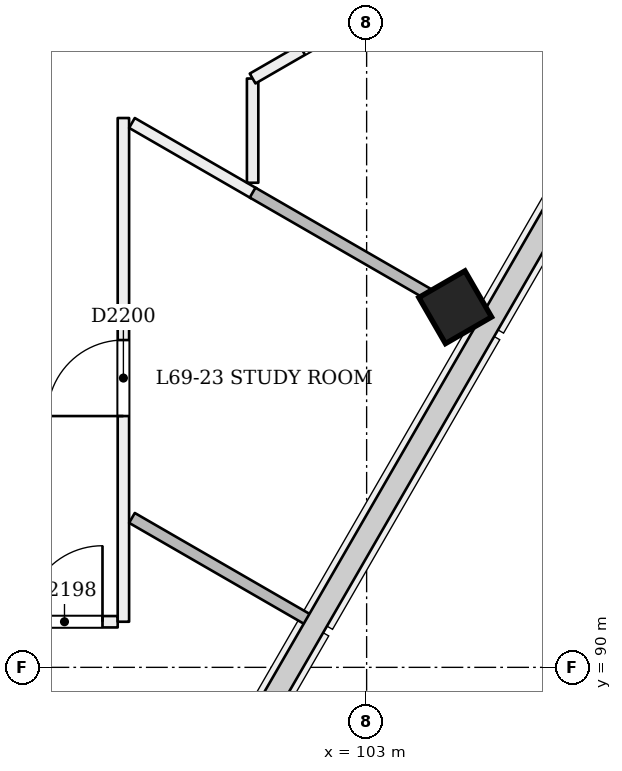
"""IFC4 building model, lengths in metres.
Left out: names, types, materials, properties, quantities, classifications, styles, units other than length and angle.
Written with IfcOpenShell. Run it as: python <this file> out.ifc"""

import sys

from ifc_helpers import new_model, si_unit, direction, frame, frame_2d, origin, origin_2d, place, context, subcontext, project, spatial, rectangle, extrude, element, fill, save


model = new_model("IFC4")
c1 = context("Model", 3, precision=1e-05, world=origin(), true_north=direction((0.0, 1.0)))
c2 = subcontext(c1, "Body", "Model", "MODEL_VIEW")
j1 = project(units=[si_unit("LENGTHUNIT", "METRE"), si_unit("PLANEANGLEUNIT", "RADIAN")], contexts=[c1])
p1 = place(None, origin())
s1 = spatial("IfcSite", under=j1, at=p1, CompositionType="ELEMENT")
p2 = place(p1, origin())
s2 = spatial("IfcBuilding", under=s1, at=p2, CompositionType="ELEMENT")
p3 = place(p2, frame((0.0, 0.0, 268.0)))
s3 = spatial("IfcBuildingStorey", under=s2, at=p3, CompositionType="ELEMENT", Elevation=268.0)
p4 = place(p3, frame((104.192, 94.69, -0.021), z_axis=(-0.02215369191, 0.038413282303, 0.999016333038), x_axis=(-0.500652759639, -0.865364210869, 0.022171982582)))
e1 = element("IfcColumn", 1, at=p4, inside=s3, PredefinedType="COLUMN", context=c2, shape_type="SweptSolid", body=[
    extrude(rectangle(XDim=0.7, YDim=0.7, at=origin_2d()), origin(), (0.0, 0.0, 1.0), 3.604),
])
p5 = place(p3, frame((94.844, 90.6, 0.0), z_axis=(0.0, 0.0, 1.0), x_axis=(1.0, 0.0, 0.0)))
e2 = element("IfcWall", 2, at=p5, inside=s3, PredefinedType="PARTITIONING", context=c2, shape_type="SweptSolid", body=[
    extrude(rectangle(XDim=4.881, YDim=0.15, at=frame_2d((2.44, 0.0))), origin(), (0.0, 0.0, 1.0), 3.2),
])
p6 = place(p5, frame((3.681, 0.0, 0.0)))
e3 = element("IfcOpeningElement", 3, at=p6, cuts=e2, PredefinedType="OPENING", context=c2, shape_type="SweptSolid", body=[
    extrude(rectangle(XDim=1.0, YDim=2.1, at=frame_2d((0.5, 1.05))), frame((0.0, 0.085, 0.0), z_axis=(0.0, -1.0, 0.0), x_axis=(1.0, 0.0, 0.0)), (0.0, 0.0, 1.0), 0.171),
])
p7 = place(p3, frame((99.8, 90.6, 0.0), z_axis=(0.0, 0.0, 1.0), x_axis=(0.0, 1.0, 0.0)))
e4 = element("IfcWall", 4, at=p7, inside=s3, PredefinedType="PARTITIONING", context=c2, shape_type="SweptSolid", body=[
    extrude(rectangle(XDim=6.627, YDim=0.15, at=frame_2d((3.313, 0.0))), origin(), (0.0, 0.0, 1.0), 3.2),
])
p8 = place(p7, frame((2.706, 0.0, 0.0)))
e5 = element("IfcOpeningElement", 5, at=p8, cuts=e4, PredefinedType="OPENING", context=c2, shape_type="SweptSolid", body=[
    extrude(rectangle(XDim=1.0, YDim=2.1, at=frame_2d((0.5, 1.05))), frame((0.0, 0.085, 0.0), z_axis=(0.0, -1.0, 0.0), x_axis=(1.0, 0.0, 0.0)), (0.0, 0.0, 1.0), 0.171),
])
p9 = place(p3, frame((99.913, 97.162, 0.0), z_axis=(0.0, 0.0, 1.0), x_axis=(0.866021029023, -0.500007577232, 0.0)))
e6 = element("IfcWall", 6, at=p9, inside=s3, PredefinedType="PARTITIONING", context=c2, shape_type="SweptSolid", body=[
    extrude(rectangle(XDim=1.853, YDim=0.15, at=frame_2d((0.927, 0.0))), origin(), (0.0, 0.0, 1.0), 3.2),
])
p10 = place(p3, frame((101.5, 96.375, 0.0), z_axis=(0.0, 0.0, 1.0), x_axis=(0.0, 1.0, 0.0)))
e7 = element("IfcWall", 7, at=p10, inside=s3, PredefinedType="PARTITIONING", context=c2, shape_type="SweptSolid", body=[
    extrude(rectangle(XDim=1.371, YDim=0.15, at=frame_2d((0.686, 0.0))), origin(), (0.0, 0.0, 1.0), 3.2),
])
p11 = place(p3, frame((101.5, 97.747, 0.0), z_axis=(0.0, 0.0, 1.0), x_axis=(0.866036427558, 0.499980905779, 0.0)))
e8 = element("IfcWall", 8, at=p11, inside=s3, PredefinedType="PARTITIONING", context=c2, shape_type="SweptSolid", body=[
    extrude(rectangle(XDim=2.262, YDim=0.15, at=frame_2d((1.131, 0.0))), origin(), (0.0, 0.0, 1.0), 3.2),
])
p12 = place(p11, frame((0.753, 0.0, 0.0)))
e9 = element("IfcOpeningElement", 9, at=p12, cuts=e8, PredefinedType="OPENING", context=c2, shape_type="SweptSolid", body=[
    extrude(rectangle(XDim=1.2, YDim=2.1, at=frame_2d((0.6, 1.05))), frame((0.0, 0.085, 0.0), z_axis=(0.0, -1.0, 0.0), x_axis=(1.0, 0.0, 0.0)), (0.0, 0.0, 1.0), 0.171),
])
p13 = place(p3, frame((102.262, 90.609, 0.0), z_axis=(0.0, 0.0, 1.0), x_axis=(-0.866025261224, 0.500000246922, 0.0)))
e10 = element("IfcWall", 10, at=p13, inside=s3, PredefinedType="PARTITIONING", context=c2, shape_type="SweptSolid", body=[
    extrude(rectangle(XDim=2.713, YDim=0.15, at=frame_2d((1.357, 0.0))), origin(), (0.0, 0.0, 1.0), 2.7),
])
p14 = place(p3, frame((104.495, 94.516, 0.0), z_axis=(0.0, 0.0, 1.0), x_axis=(-0.866053925764, 0.499950595228, 0.0)))
e11 = element("IfcWall", 11, at=p14, inside=s3, PredefinedType="PARTITIONING", context=c2, shape_type="SweptSolid", body=[
    extrude(rectangle(XDim=3.458, YDim=0.15, at=frame_2d((1.729, 0.0))), origin(), (0.0, 0.0, 1.0), 2.7),
])
p15 = place(p6, origin())
e12 = element("IfcDoor", 12, at=p15, inside=s3, OperationType="SINGLE_SWING_RIGHT", PredefinedType="NOTDEFINED", context=c2, shape_type="SweptSolid", body=[
    extrude(rectangle(XDim=1.0, YDim=2.1, at=frame_2d((0.5, 1.05))), frame((0.0, 0.025, 0.0), z_axis=(0.0, -1.0, 0.0), x_axis=(1.0, 0.0, 0.0)), (0.0, 0.0, 1.0), 0.05),
])
fill(e3, e12)
p16 = place(p8, origin())
e13 = element("IfcDoor", 13, at=p16, inside=s3, OperationType="SINGLE_SWING_LEFT", PredefinedType="NOTDEFINED", context=c2, shape_type="SweptSolid", body=[
    extrude(rectangle(XDim=1.0, YDim=2.1, at=frame_2d((0.5, 1.05))), frame((0.0, 0.025, 0.0), z_axis=(0.0, -1.0, 0.0), x_axis=(1.0, 0.0, 0.0)), (0.0, 0.0, 1.0), 0.05),
])
fill(e5, e13)
save(model, sys.argv[1])
